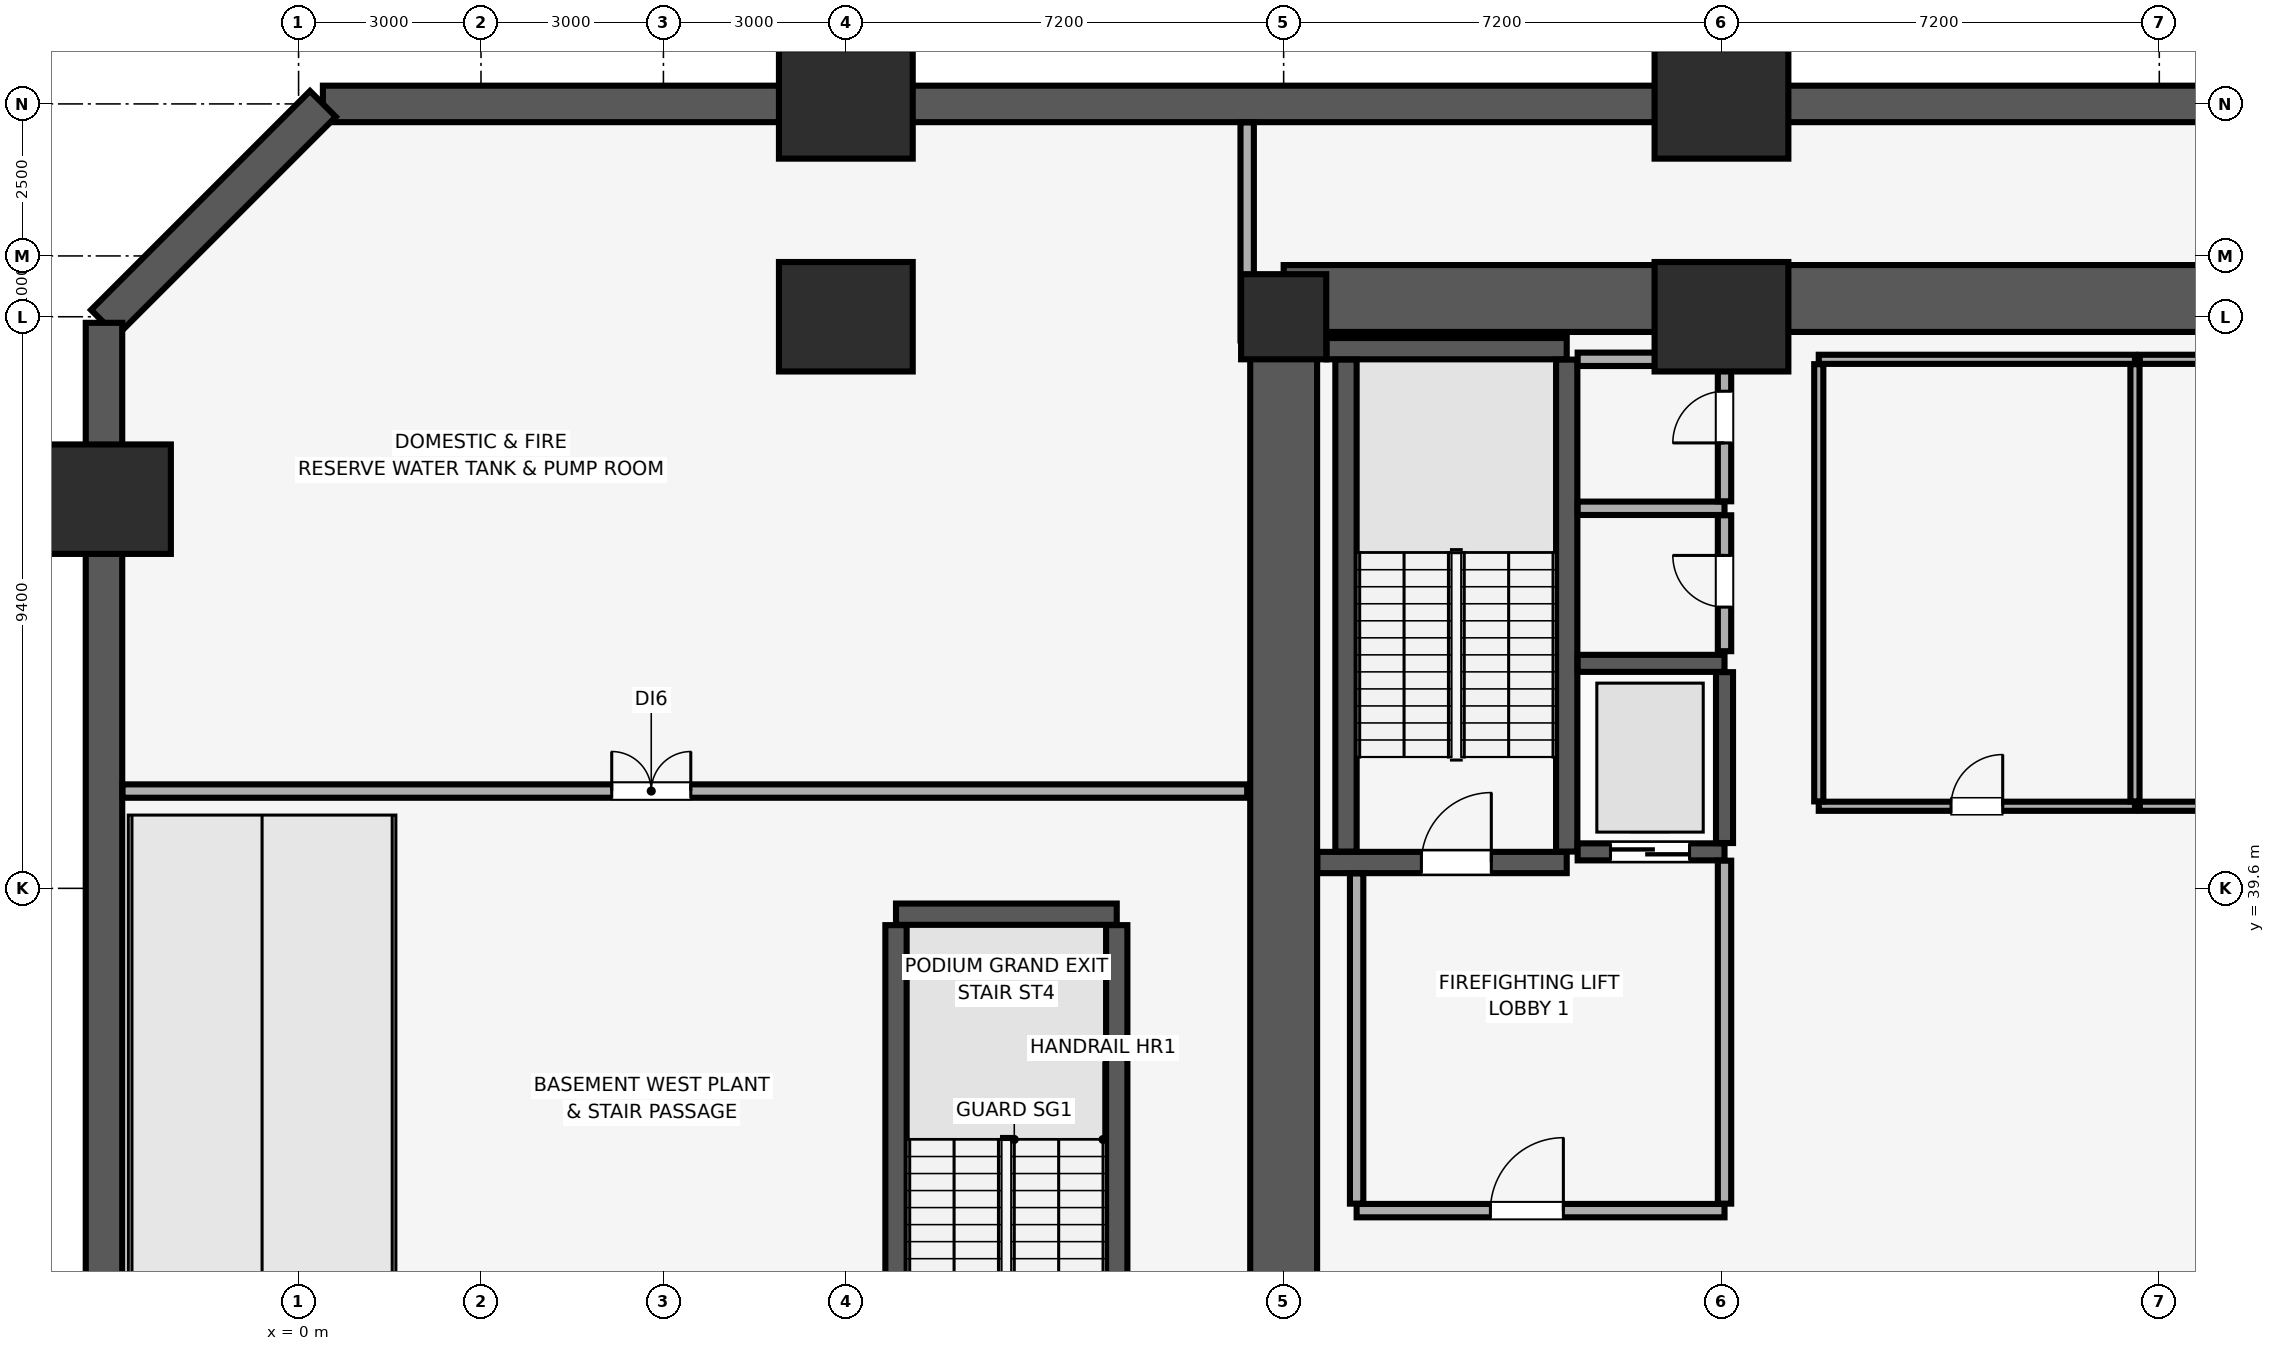
"""IFC4 building model, lengths in metres.
Left out: names, types, materials, properties, quantities, classifications, styles, units other than length and angle.
Written with IfcOpenShell. Run it as: python <this file> out.ifc"""

import sys

from ifc_helpers import new_model, si_unit, direction, frame, frame_2d, origin, origin_2d, place, context, subcontext, project, spatial, rectangle, extrude, element, fill, save


model = new_model("IFC4")
c1 = context("Model", 3, precision=1e-05, world=origin(), true_north=direction((0.0, 1.0)))
c2 = subcontext(c1, "Body", "Model", "MODEL_VIEW")
j1 = project(units=[si_unit("LENGTHUNIT", "METRE"), si_unit("PLANEANGLEUNIT", "RADIAN")], contexts=[c1])
p1 = place(None, origin())
s1 = spatial("IfcSite", under=j1, at=p1, CompositionType="ELEMENT")
p2 = place(p1, origin())
s2 = spatial("IfcBuilding", under=s1, at=p2, CompositionType="ELEMENT")
p3 = place(p2, frame((0.0, 0.0, -9.2)))
s3 = spatial("IfcBuildingStorey", under=s2, at=p3, CompositionType="ELEMENT", Elevation=-9.2)
for number, where, z_axis, x_axis in (
    (1, (-3.2, 46.0, 0.0), (0.0, 0.0, 1.0), (1.0, 0.0, 0.0)),
    (2, (9.0, 49.0, 0.0), (0.0, 0.0, 1.0), (1.0, 0.0, 0.0)),
    (3, (9.0, 52.5, 0.0), (0.0, 0.0, 1.0), (1.0, 0.0, 0.0)),
    (4, (23.4, 49.0, 0.0), (0.0, 0.0, 1.0), (1.0, 0.0, 0.0)),
    (5, (23.4, 52.5, 0.0), (0.0, 0.0, 1.0), (1.0, 0.0, 0.0)),
):
    element("IfcColumn", number, at=place(p3, frame(where, z_axis=z_axis, x_axis=x_axis)), inside=s3, PredefinedType="USERDEFINED", context=c2, shape_type="SweptSolid", body=[
        extrude(rectangle(XDim=2.2, YDim=1.8, at=origin_2d()), origin(), (0.0, 0.0, 1.0), 4.3),
    ])
p4 = place(p3, frame((16.2, 49.0, 0.0), z_axis=(0.0, 0.0, 1.0), x_axis=(1.0, 0.0, 0.0)))
e6 = element("IfcColumn", 6, at=p4, inside=s3, PredefinedType="COLUMN", context=c2, shape_type="SweptSolid", body=[
    extrude(rectangle(XDim=1.4, YDim=1.4, at=origin_2d()), origin(), (0.0, 0.0, 1.0), 4.3),
])
p5 = place(p3, frame((83.6, 52.5, 0.0), z_axis=(0.0, 0.0, 1.0), x_axis=(-1.0, 0.0, 0.0)))
e7 = element("IfcWall", 7, at=p5, inside=s3, PredefinedType="USERDEFINED", context=c2, shape_type="SweptSolid", body=[
    extrude(rectangle(XDim=83.2, YDim=0.6, at=frame_2d((41.6, 0.0))), origin(), (0.0, 0.0, 1.0), 4.3),
])
p6 = place(p3, frame((0.4, 52.5, 0.0), z_axis=(0.0, 0.0, 1.0), x_axis=(-0.707082803744, -0.707130757816, 0.0)))
e8 = element("IfcWall", 8, at=p6, inside=s3, PredefinedType="USERDEFINED", context=c2, shape_type="SweptSolid", body=[
    extrude(rectangle(XDim=5.091, YDim=0.6, at=frame_2d((2.545, 0.0))), origin(), (0.0, 0.0, 1.0), 4.3),
])
p7 = place(p3, frame((-3.2, 48.9, 0.0), z_axis=(0.0, 0.0, 1.0), x_axis=(0.0, -1.0, 0.0)))
e9 = element("IfcWall", 9, at=p7, inside=s3, PredefinedType="USERDEFINED", context=c2, shape_type="SweptSolid", body=[
    extrude(rectangle(XDim=47.8, YDim=0.6, at=frame_2d((23.9, 0.0))), origin(), (0.0, 0.0, 1.0), 4.3),
])
p8 = place(p3, frame((16.2, 49.3, 0.0), z_axis=(0.0, 0.0, 1.0), x_axis=(1.0, 0.0, 0.0)))
e10 = element("IfcWall", 10, at=p8, inside=s3, PredefinedType="SHEAR", context=c2, shape_type="SweptSolid", body=[
    extrude(rectangle(XDim=51.6, YDim=1.1, at=frame_2d((25.8, 0.0))), origin(), (0.0, 0.0, 1.0), 4.3),
])
p9 = place(p3, frame((16.2, 29.4, 0.0), z_axis=(0.0, 0.0, 1.0), x_axis=(0.0, 1.0, 0.0)))
e11 = element("IfcWall", 11, at=p9, inside=s3, PredefinedType="SHEAR", context=c2, shape_type="SweptSolid", body=[
    extrude(rectangle(XDim=19.2, YDim=1.1, at=frame_2d((9.6, 0.0))), origin(), (0.0, 0.0, 1.0), 4.3),
])
p10 = place(p3, frame((16.755, 40.025, 0.0), z_axis=(0.0, 0.0, 1.0), x_axis=(1.0, 0.0, 0.0)))
e12 = element("IfcWall", 12, at=p10, inside=s3, PredefinedType="SHEAR", context=c2, shape_type="SweptSolid", body=[
    extrude(rectangle(XDim=4.1, YDim=0.35, at=frame_2d((2.05, 0.0))), origin(), (0.0, 0.0, 1.0), 4.3),
])
p11 = place(p10, frame((1.71, 0.0, 0.0)))
e13 = element("IfcOpeningElement", 13, at=p11, cuts=e12, PredefinedType="OPENING", context=c2, shape_type="SweptSolid", body=[
    extrude(rectangle(XDim=1.15, YDim=2.15, at=frame_2d((0.575, 1.075))), frame((0.0, 0.185, 0.0), z_axis=(0.0, -1.0, 0.0), x_axis=(1.0, 0.0, 0.0)), (0.0, 0.0, 1.0), 0.37),
])
p12 = place(p3, frame((16.905, 48.475, 0.0), z_axis=(0.0, 0.0, 1.0), x_axis=(1.0, 0.0, 0.0)))
e14 = element("IfcWall", 14, at=p12, inside=s3, PredefinedType="SHEAR", context=c2, shape_type="SweptSolid", body=[
    extrude(rectangle(XDim=3.95, YDim=0.35, at=frame_2d((1.975, 0.0))), origin(), (0.0, 0.0, 1.0), 4.3),
])
for number, where, z_axis, x_axis in (
    (15, (17.225, 40.205, 0.0), (0.0, 0.0, 1.0), (0.0, 1.0, 0.0)),
    (16, (20.855, 40.205, 0.0), (0.0, 0.0, 1.0), (0.0, 1.0, 0.0)),
):
    element("IfcWall", number, at=place(p3, frame(where, z_axis=z_axis, x_axis=x_axis)), inside=s3, PredefinedType="SHEAR", context=c2, shape_type="SweptSolid", body=[
        extrude(rectangle(XDim=8.09, YDim=0.35, at=frame_2d((4.045, 0.0))), origin(), (0.0, 0.0, 1.0), 4.3),
    ])
p13 = place(p3, frame((9.825, 39.175, 0.0), z_axis=(0.0, 0.0, 1.0), x_axis=(1.0, 0.0, 0.0)))
e17 = element("IfcWall", 17, at=p13, inside=s3, PredefinedType="SHEAR", context=c2, shape_type="SweptSolid", body=[
    extrude(rectangle(XDim=3.63, YDim=0.35, at=frame_2d((1.815, 0.0))), origin(), (0.0, 0.0, 1.0), 4.3),
])
for number, where, z_axis, x_axis in (
    (18, (9.825, 30.555, 0.0), (0.0, 0.0, 1.0), (0.0, 1.0, 0.0)),
    (19, (13.455, 30.555, 0.0), (0.0, 0.0, 1.0), (0.0, 1.0, 0.0)),
):
    element("IfcWall", number, at=place(p3, frame(where, z_axis=z_axis, x_axis=x_axis)), inside=s3, PredefinedType="SHEAR", context=c2, shape_type="SweptSolid", body=[
        extrude(rectangle(XDim=8.44, YDim=0.35, at=frame_2d((4.22, 0.0))), origin(), (0.0, 0.0, 1.0), 4.3),
    ])
p14 = place(p3, frame((21.035, 40.2, 0.0), z_axis=(0.0, 0.0, 1.0), x_axis=(1.0, 0.0, 0.0)))
e20 = element("IfcWall", 20, at=p14, inside=s3, PredefinedType="SHEAR", context=c2, shape_type="SweptSolid", body=[
    extrude(rectangle(XDim=2.415, YDim=0.28, at=frame_2d((1.208, 0.0))), origin(), (0.0, 0.0, 1.0), 4.3),
])
p15 = place(p14, frame((0.54, 0.0, 0.0)))
e21 = element("IfcOpeningElement", 21, at=p15, cuts=e20, PredefinedType="OPENING", context=c2, shape_type="SweptSolid", body=[
    extrude(rectangle(XDim=1.3, YDim=2.3, at=frame_2d((0.65, 1.15))), frame((0.0, 0.15, 0.0), z_axis=(0.0, -1.0, 0.0), x_axis=(1.0, 0.0, 0.0)), (0.0, 0.0, 1.0), 0.3),
])
p16 = place(p3, frame((21.035, 43.3, 0.0), z_axis=(0.0, 0.0, 1.0), x_axis=(1.0, 0.0, 0.0)))
e22 = element("IfcWall", 22, at=p16, inside=s3, PredefinedType="SHEAR", context=c2, shape_type="SweptSolid", body=[
    extrude(rectangle(XDim=2.415, YDim=0.28, at=frame_2d((1.208, 0.0))), origin(), (0.0, 0.0, 1.0), 4.3),
])
p17 = place(p3, frame((23.45, 40.345, 0.0), z_axis=(0.0, 0.0, 1.0), x_axis=(0.0, 1.0, 0.0)))
e23 = element("IfcWall", 23, at=p17, inside=s3, PredefinedType="SHEAR", context=c2, shape_type="SweptSolid", body=[
    extrude(rectangle(XDim=2.81, YDim=0.28, at=frame_2d((1.405, 0.0))), origin(), (0.0, 0.0, 1.0), 4.3),
])
p18 = place(p3, frame((17.4, 34.3, 0.0), z_axis=(0.0, 0.0, 1.0), x_axis=(1.0, 0.0, 0.0)))
e24 = element("IfcWall", 24, at=p18, inside=s3, PredefinedType="PARTITIONING", context=c2, shape_type="SweptSolid", body=[
    extrude(rectangle(XDim=6.05, YDim=0.22, at=frame_2d((3.025, 0.0))), origin(), (0.0, 0.0, 1.0), 4.3),
])
p19 = place(p18, frame((2.2, 0.0, 0.0)))
e25 = element("IfcOpeningElement", 25, at=p19, cuts=e24, PredefinedType="OPENING", context=c2, shape_type="SweptSolid", body=[
    extrude(rectangle(XDim=1.2, YDim=2.15, at=frame_2d((0.6, 1.075))), frame((0.0, 0.12, 0.0), z_axis=(0.0, -1.0, 0.0), x_axis=(1.0, 0.0, 0.0)), (0.0, 0.0, 1.0), 0.24),
])
p20 = place(p3, frame((17.4, 34.415, 0.0), z_axis=(0.0, 0.0, 1.0), x_axis=(0.0, 1.0, 0.0)))
e26 = element("IfcWall", 26, at=p20, inside=s3, PredefinedType="PARTITIONING", context=c2, shape_type="SweptSolid", body=[
    extrude(rectangle(XDim=5.43, YDim=0.22, at=frame_2d((2.715, 0.0))), origin(), (0.0, 0.0, 1.0), 4.3),
])
p21 = place(p3, frame((23.45, 34.415, 0.0), z_axis=(0.0, 0.0, 1.0), x_axis=(0.0, 1.0, 0.0)))
e27 = element("IfcWall", 27, at=p21, inside=s3, PredefinedType="PARTITIONING", context=c2, shape_type="SweptSolid", body=[
    extrude(rectangle(XDim=5.64, YDim=0.22, at=frame_2d((2.82, 0.0))), origin(), (0.0, 0.0, 1.0), 4.3),
])
p22 = place(p3, frame((21.035, 45.85, 0.0), z_axis=(0.0, 0.0, 1.0), x_axis=(1.0, 0.0, 0.0)))
e28 = element("IfcWall", 28, at=p22, inside=s3, PredefinedType="PARTITIONING", context=c2, shape_type="SweptSolid", body=[
    extrude(rectangle(XDim=2.415, YDim=0.22, at=frame_2d((1.208, 0.0))), origin(), (0.0, 0.0, 1.0), 4.3),
])
p23 = place(p3, frame((23.45, 43.5, 0.0), z_axis=(0.0, 0.0, 1.0), x_axis=(0.0, 1.0, 0.0)))
e29 = element("IfcWall", 29, at=p23, inside=s3, PredefinedType="PARTITIONING", context=c2, shape_type="SweptSolid", body=[
    extrude(rectangle(XDim=2.235, YDim=0.22, at=frame_2d((1.118, 0.0))), origin(), (0.0, 0.0, 1.0), 4.3),
])
p24 = place(p23, frame((0.725, 0.0, 0.0)))
e30 = element("IfcOpeningElement", 30, at=p24, cuts=e29, PredefinedType="OPENING", context=c2, shape_type="SweptSolid", body=[
    extrude(rectangle(XDim=0.85, YDim=2.1, at=frame_2d((0.425, 1.05))), frame((0.0, 0.12, 0.0), z_axis=(0.0, -1.0, 0.0), x_axis=(1.0, 0.0, 0.0)), (0.0, 0.0, 1.0), 0.24),
])
p25 = place(p3, frame((21.035, 48.3, 0.0), z_axis=(0.0, 0.0, 1.0), x_axis=(1.0, 0.0, 0.0)))
e31 = element("IfcWall", 31, at=p25, inside=s3, PredefinedType="PARTITIONING", context=c2, shape_type="SweptSolid", body=[
    extrude(rectangle(XDim=2.415, YDim=0.22, at=frame_2d((1.208, 0.0))), origin(), (0.0, 0.0, 1.0), 4.3),
])
p26 = place(p3, frame((23.45, 45.965, 0.0), z_axis=(0.0, 0.0, 1.0), x_axis=(0.0, 1.0, 0.0)))
e32 = element("IfcWall", 32, at=p26, inside=s3, PredefinedType="PARTITIONING", context=c2, shape_type="SweptSolid", body=[
    extrude(rectangle(XDim=2.22, YDim=0.22, at=frame_2d((1.11, 0.0))), origin(), (0.0, 0.0, 1.0), 4.3),
])
p27 = place(p26, frame((0.96, 0.0, 0.0)))
e33 = element("IfcOpeningElement", 33, at=p27, cuts=e32, PredefinedType="OPENING", context=c2, shape_type="SweptSolid", body=[
    extrude(rectangle(XDim=0.85, YDim=2.1, at=frame_2d((0.425, 1.05))), frame((0.0, 0.12, 0.0), z_axis=(0.0, -1.0, 0.0), x_axis=(1.0, 0.0, 0.0)), (0.0, 0.0, 1.0), 0.24),
])
p28 = place(p3, frame((25.0, 40.95, 0.0), z_axis=(0.0, 0.0, 1.0), x_axis=(1.0, 0.0, 0.0)))
e34 = element("IfcWall", 34, at=p28, inside=s3, PredefinedType="PARTITIONING", context=c2, shape_type="SweptSolid", body=[
    extrude(rectangle(XDim=5.2, YDim=0.15, at=frame_2d((2.6, 0.0))), origin(), (0.0, 0.0, 1.0), 4.3),
])
p29 = place(p28, frame((2.175, 0.0, 0.0)))
e35 = element("IfcOpeningElement", 35, at=p29, cuts=e34, PredefinedType="OPENING", context=c2, shape_type="SweptSolid", body=[
    extrude(rectangle(XDim=0.85, YDim=2.1, at=frame_2d((0.425, 1.05))), frame((0.0, 0.085, 0.0), z_axis=(0.0, -1.0, 0.0), x_axis=(1.0, 0.0, 0.0)), (0.0, 0.0, 1.0), 0.17),
])
p30 = place(p3, frame((25.0, 48.3, 0.0), z_axis=(0.0, 0.0, 1.0), x_axis=(1.0, 0.0, 0.0)))
e36 = element("IfcWall", 36, at=p30, inside=s3, PredefinedType="PARTITIONING", context=c2, shape_type="SweptSolid", body=[
    extrude(rectangle(XDim=5.2, YDim=0.15, at=frame_2d((2.6, 0.0))), origin(), (0.0, 0.0, 1.0), 4.3),
])
for number, where, z_axis, x_axis in (
    (37, (25.0, 41.03, 0.0), (0.0, 0.0, 1.0), (0.0, 1.0, 0.0)),
    (38, (30.2, 41.03, 0.0), (0.0, 0.0, 1.0), (0.0, 1.0, 0.0)),
):
    element("IfcWall", number, at=place(p3, frame(where, z_axis=z_axis, x_axis=x_axis)), inside=s3, PredefinedType="PARTITIONING", context=c2, shape_type="SweptSolid", body=[
        extrude(rectangle(XDim=7.19, YDim=0.15, at=frame_2d((3.595, 0.0))), origin(), (0.0, 0.0, 1.0), 4.3),
    ])
p31 = place(p3, frame((30.28, 40.95, 0.0), z_axis=(0.0, 0.0, 1.0), x_axis=(1.0, 0.0, 0.0)))
e39 = element("IfcWall", 39, at=p31, inside=s3, PredefinedType="PARTITIONING", context=c2, shape_type="SweptSolid", body=[
    extrude(rectangle(XDim=4.82, YDim=0.15, at=frame_2d((2.41, 0.0))), origin(), (0.0, 0.0, 1.0), 4.3),
])
p32 = place(p31, frame((1.87, 0.0, 0.0)))
e40 = element("IfcOpeningElement", 40, at=p32, cuts=e39, PredefinedType="OPENING", context=c2, shape_type="SweptSolid", body=[
    extrude(rectangle(XDim=1.0, YDim=2.15, at=frame_2d((0.5, 1.075))), frame((0.0, 0.085, 0.0), z_axis=(0.0, -1.0, 0.0), x_axis=(1.0, 0.0, 0.0)), (0.0, 0.0, 1.0), 0.17),
])
p33 = place(p3, frame((30.28, 48.3, 0.0), z_axis=(0.0, 0.0, 1.0), x_axis=(1.0, 0.0, 0.0)))
e41 = element("IfcWall", 41, at=p33, inside=s3, PredefinedType="PARTITIONING", context=c2, shape_type="SweptSolid", body=[
    extrude(rectangle(XDim=4.82, YDim=0.15, at=frame_2d((2.41, 0.0))), origin(), (0.0, 0.0, 1.0), 4.3),
])
p34 = place(p3, frame((-2.895, 41.2, 0.0), z_axis=(0.0, 0.0, 1.0), x_axis=(1.0, 0.0, 0.0)))
e42 = element("IfcWall", 42, at=p34, inside=s3, PredefinedType="PARTITIONING", context=c2, shape_type="SweptSolid", body=[
    extrude(rectangle(XDim=18.495, YDim=0.22, at=frame_2d((9.248, 0.0))), origin(), (0.0, 0.0, 1.0), 4.3),
])
p35 = place(p34, frame((8.045, 0.0, 0.0)))
e43 = element("IfcOpeningElement", 43, at=p35, cuts=e42, PredefinedType="OPENING", context=c2, shape_type="SweptSolid", body=[
    extrude(rectangle(XDim=1.3, YDim=2.2, at=frame_2d((0.65, 1.1))), frame((0.0, 0.12, 0.0), z_axis=(0.0, -1.0, 0.0), x_axis=(1.0, 0.0, 0.0)), (0.0, 0.0, 1.0), 0.24),
])
p36 = place(p3, frame((15.6, 48.61, 0.0), z_axis=(0.0, 0.0, 1.0), x_axis=(0.0, 1.0, 0.0)))
e44 = element("IfcWall", 44, at=p36, inside=s3, PredefinedType="PARTITIONING", context=c2, shape_type="SweptSolid", body=[
    extrude(rectangle(XDim=3.585, YDim=0.22, at=frame_2d((1.792, 0.0))), origin(), (0.0, 0.0, 1.0), 4.3),
])
p37 = place(p11, origin())
e45 = element("IfcDoor", 45, at=p37, inside=s3, OperationType="SINGLE_SWING_RIGHT", PredefinedType="DOOR", context=c2, shape_type="SweptSolid", body=[
    extrude(rectangle(XDim=1.15, YDim=2.15, at=frame_2d((0.575, 1.075))), frame((0.0, 0.025, 0.0), z_axis=(0.0, -1.0, 0.0), x_axis=(1.0, 0.0, 0.0)), (0.0, 0.0, 1.0), 0.05),
])
fill(e13, e45)
p38 = place(p15, origin())
e46 = element("IfcDoor", 46, at=p38, inside=s3, OperationType="DOUBLE_DOOR_SLIDING", PredefinedType="DOOR", context=c2, shape_type="SweptSolid", body=[
    extrude(rectangle(XDim=1.3, YDim=2.3, at=frame_2d((0.65, 1.15))), frame((0.0, 0.025, 0.0), z_axis=(0.0, -1.0, 0.0), x_axis=(1.0, 0.0, 0.0)), (0.0, 0.0, 1.0), 0.05),
])
fill(e21, e46)
p39 = place(p19, origin())
e47 = element("IfcDoor", 47, at=p39, inside=s3, OperationType="SINGLE_SWING_RIGHT", PredefinedType="DOOR", context=c2, shape_type="SweptSolid", body=[
    extrude(rectangle(XDim=1.2, YDim=2.15, at=frame_2d((0.6, 1.075))), frame((0.0, 0.025, 0.0), z_axis=(0.0, -1.0, 0.0), x_axis=(1.0, 0.0, 0.0)), (0.0, 0.0, 1.0), 0.05),
])
fill(e25, e47)
p40 = place(p24, origin())
e48 = element("IfcDoor", 48, at=p40, inside=s3, OperationType="SINGLE_SWING_RIGHT", PredefinedType="DOOR", context=c2, shape_type="SweptSolid", body=[
    extrude(rectangle(XDim=0.85, YDim=2.1, at=frame_2d((0.425, 1.05))), frame((0.0, 0.025, 0.0), z_axis=(0.0, -1.0, 0.0), x_axis=(1.0, 0.0, 0.0)), (0.0, 0.0, 1.0), 0.05),
])
fill(e30, e48)
p41 = place(p27, origin())
e49 = element("IfcDoor", 49, at=p41, inside=s3, OperationType="SINGLE_SWING_LEFT", PredefinedType="DOOR", context=c2, shape_type="SweptSolid", body=[
    extrude(rectangle(XDim=0.85, YDim=2.1, at=frame_2d((0.425, 1.05))), frame((0.0, 0.025, 0.0), z_axis=(0.0, -1.0, 0.0), x_axis=(1.0, 0.0, 0.0)), (0.0, 0.0, 1.0), 0.05),
])
fill(e33, e49)
p42 = place(p29, origin())
e50 = element("IfcDoor", 50, at=p42, inside=s3, OperationType="SINGLE_SWING_RIGHT", PredefinedType="DOOR", context=c2, shape_type="SweptSolid", body=[
    extrude(rectangle(XDim=0.85, YDim=2.1, at=frame_2d((0.425, 1.05))), frame((0.0, 0.025, 0.0), z_axis=(0.0, -1.0, 0.0), x_axis=(1.0, 0.0, 0.0)), (0.0, 0.0, 1.0), 0.05),
])
fill(e35, e50)
p43 = place(p35, origin())
e51 = element("IfcDoor", 51, at=p43, inside=s3, OperationType="DOUBLE_DOOR_SINGLE_SWING", PredefinedType="DOOR", context=c2, shape_type="SweptSolid", body=[
    extrude(rectangle(XDim=1.3, YDim=2.2, at=frame_2d((0.65, 1.1))), frame((0.0, 0.025, 0.0), z_axis=(0.0, -1.0, 0.0), x_axis=(1.0, 0.0, 0.0)), (0.0, 0.0, 1.0), 0.05),
])
fill(e43, e51)
save(model, sys.argv[1])
